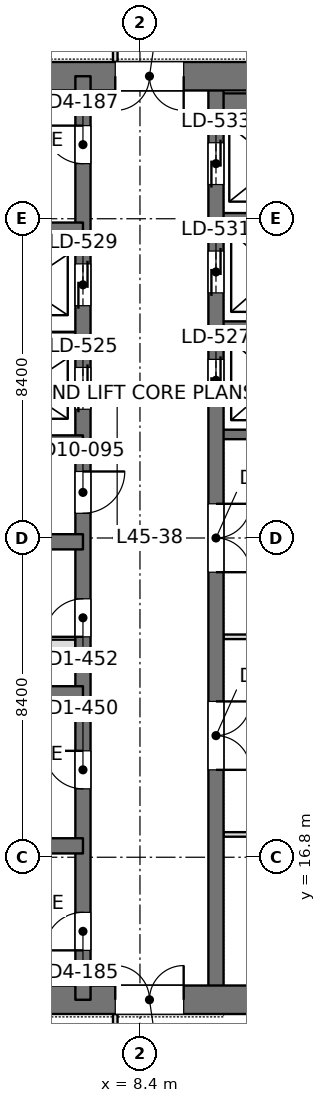
"""IFC4 building model, lengths in metres.
Left out: names, types, materials, properties, quantities, classifications, styles, units other than length and angle.
Written with IfcOpenShell. Run it as: python <this file> out.ifc"""

import sys

from ifc_helpers import new_model, si_unit, direction, frame, frame_2d, origin, place, context, subcontext, project, spatial, rectangle, extrude, element, fill, save


model = new_model("IFC4")
c1 = context("Model", 3, precision=1e-05, world=origin(), true_north=direction((0.0, 1.0)))
c2 = subcontext(c1, "Body", "Model", "MODEL_VIEW")
j1 = project(units=[si_unit("LENGTHUNIT", "METRE"), si_unit("PLANEANGLEUNIT", "RADIAN")], contexts=[c1])
p1 = place(None, origin())
s1 = spatial("IfcSite", under=j1, at=p1, CompositionType="ELEMENT")
p2 = place(p1, origin())
s2 = spatial("IfcBuilding", under=s1, at=p2, CompositionType="ELEMENT")
p3 = place(p2, frame((0.0, 0.0, 198.6)))
s3 = spatial("IfcBuildingStorey", under=s2, at=p3, CompositionType="ELEMENT", Elevation=198.6)
p4 = place(p3, frame((-1.125, 13.05, 0.0), z_axis=(0.0, 0.0, 1.0), x_axis=(1.0, 0.0, 0.0)))
e1 = element("IfcWall", 1, at=p4, inside=s3, PredefinedType="SHEAR", context=c2, shape_type="SweptSolid", body=[
    extrude(rectangle(XDim=17.85, YDim=0.75, at=frame_2d((8.925, 0.0))), origin(), (0.0, 0.0, 1.0), 4.2),
])
p5 = place(p4, frame((8.875, 0.0, 0.0)))
e2 = element("IfcOpeningElement", 2, at=p5, cuts=e1, PredefinedType="OPENING", context=c2, shape_type="SweptSolid", body=[
    extrude(rectangle(XDim=1.8, YDim=2.4, at=frame_2d((0.9, 1.2))), frame((0.0, 0.385, 0.0), z_axis=(0.0, -1.0, 0.0), x_axis=(1.0, 0.0, 0.0)), (0.0, 0.0, 1.0), 0.77),
])
p6 = place(p3, frame((-1.125, 37.35, 0.0), z_axis=(0.0, 0.0, 1.0), x_axis=(1.0, 0.0, 0.0)))
e3 = element("IfcWall", 3, at=p6, inside=s3, PredefinedType="SHEAR", context=c2, shape_type="SweptSolid", body=[
    extrude(rectangle(XDim=17.85, YDim=0.75, at=frame_2d((8.925, 0.0))), origin(), (0.0, 0.0, 1.0), 4.2),
])
p7 = place(p6, frame((8.875, 0.0, 0.0)))
e4 = element("IfcOpeningElement", 4, at=p7, cuts=e3, PredefinedType="OPENING", context=c2, shape_type="SweptSolid", body=[
    extrude(rectangle(XDim=1.8, YDim=2.4, at=frame_2d((0.9, 1.2))), frame((0.0, 0.385, 0.0), z_axis=(0.0, -1.0, 0.0), x_axis=(1.0, 0.0, 0.0)), (0.0, 0.0, 1.0), 0.77),
])
p8 = place(p3, frame((6.9, 13.05, 0.0), z_axis=(0.0, 0.0, 1.0), x_axis=(0.0, 1.0, 0.0)))
e5 = element("IfcWall", 5, at=p8, inside=s3, PredefinedType="SHEAR", context=c2, shape_type="SweptSolid", body=[
    extrude(rectangle(XDim=24.3, YDim=0.4, at=frame_2d((12.15, 0.0))), origin(), (0.0, 0.0, 1.0), 4.2),
])
p9 = place(p8, frame((1.3, 0.0, 0.0)))
e6 = element("IfcOpeningElement", 6, at=p9, cuts=e5, PredefinedType="OPENING", context=c2, shape_type="SweptSolid", body=[
    extrude(rectangle(XDim=1.0, YDim=2.2, at=frame_2d((0.5, 1.1))), frame((0.0, 0.21, 0.0), z_axis=(0.0, -1.0, 0.0), x_axis=(1.0, 0.0, 0.0)), (0.0, 0.0, 1.0), 0.42),
])
p10 = place(p8, frame((22.0, 0.0, 0.0)))
e7 = element("IfcOpeningElement", 7, at=p10, cuts=e5, PredefinedType="OPENING", context=c2, shape_type="SweptSolid", body=[
    extrude(rectangle(XDim=1.0, YDim=2.2, at=frame_2d((0.5, 1.1))), frame((0.0, 0.21, 0.0), z_axis=(0.0, -1.0, 0.0), x_axis=(1.0, 0.0, 0.0)), (0.0, 0.0, 1.0), 0.42),
])
p11 = place(p8, frame((5.55, 0.0, 0.0)))
e8 = element("IfcOpeningElement", 8, at=p11, cuts=e5, PredefinedType="OPENING", context=c2, shape_type="SweptSolid", body=[
    extrude(rectangle(XDim=1.0, YDim=2.2, at=frame_2d((0.5, 1.1))), frame((0.0, 0.21, 0.0), z_axis=(0.0, -1.0, 0.0), x_axis=(1.0, 0.0, 0.0)), (0.0, 0.0, 1.0), 0.42),
])
p12 = place(p8, frame((9.55, 0.0, 0.0)))
e9 = element("IfcOpeningElement", 9, at=p12, cuts=e5, PredefinedType="OPENING", context=c2, shape_type="SweptSolid", body=[
    extrude(rectangle(XDim=1.0, YDim=2.2, at=frame_2d((0.5, 1.1))), frame((0.0, 0.21, 0.0), z_axis=(0.0, -1.0, 0.0), x_axis=(1.0, 0.0, 0.0)), (0.0, 0.0, 1.0), 0.42),
])
p13 = place(p8, frame((12.8, 0.0, 0.0)))
e10 = element("IfcOpeningElement", 10, at=p13, cuts=e5, PredefinedType="OPENING", context=c2, shape_type="SweptSolid", body=[
    extrude(rectangle(XDim=1.1, YDim=2.2, at=frame_2d((0.55, 1.1))), frame((0.0, 0.21, 0.0), z_axis=(0.0, -1.0, 0.0), x_axis=(1.0, 0.0, 0.0)), (0.0, 0.0, 1.0), 0.42),
])
p14 = place(p8, frame((15.538, 0.0, 0.0)))
e11 = element("IfcOpeningElement", 11, at=p14, cuts=e5, PredefinedType="OPENING", context=c2, shape_type="SweptSolid", body=[
    extrude(rectangle(XDim=1.1, YDim=2.2, at=frame_2d((0.55, 1.1))), frame((0.0, 0.21, 0.0), z_axis=(0.0, -1.0, 0.0), x_axis=(1.0, 0.0, 0.0)), (0.0, 0.0, 1.0), 0.42),
])
p15 = place(p8, frame((18.262, 0.0, 0.0)))
e12 = element("IfcOpeningElement", 12, at=p15, cuts=e5, PredefinedType="OPENING", context=c2, shape_type="SweptSolid", body=[
    extrude(rectangle(XDim=1.1, YDim=2.2, at=frame_2d((0.55, 1.1))), frame((0.0, 0.21, 0.0), z_axis=(0.0, -1.0, 0.0), x_axis=(1.0, 0.0, 0.0)), (0.0, 0.0, 1.0), 0.42),
])
p16 = place(p3, frame((10.4, 13.05, 0.0), z_axis=(0.0, 0.0, 1.0), x_axis=(0.0, 1.0, 0.0)))
e13 = element("IfcWall", 13, at=p16, inside=s3, PredefinedType="SHEAR", context=c2, shape_type="SweptSolid", body=[
    extrude(rectangle(XDim=24.3, YDim=0.4, at=frame_2d((12.15, 0.0))), origin(), (0.0, 0.0, 1.0), 4.2),
])
p17 = place(p16, frame((15.75, 0.0, 0.0)))
e14 = element("IfcOpeningElement", 14, at=p17, cuts=e13, PredefinedType="OPENING", context=c2, shape_type="SweptSolid", body=[
    extrude(rectangle(XDim=1.1, YDim=2.2, at=frame_2d((0.55, 1.1))), frame((0.0, 0.21, 0.0), z_axis=(0.0, -1.0, 0.0), x_axis=(1.0, 0.0, 0.0)), (0.0, 0.0, 1.0), 0.42),
])
p18 = place(p16, frame((18.6, 0.0, 0.0)))
e15 = element("IfcOpeningElement", 15, at=p18, cuts=e13, PredefinedType="OPENING", context=c2, shape_type="SweptSolid", body=[
    extrude(rectangle(XDim=1.1, YDim=2.2, at=frame_2d((0.55, 1.1))), frame((0.0, 0.21, 0.0), z_axis=(0.0, -1.0, 0.0), x_axis=(1.0, 0.0, 0.0)), (0.0, 0.0, 1.0), 0.42),
])
p19 = place(p16, frame((21.45, 0.0, 0.0)))
e16 = element("IfcOpeningElement", 16, at=p19, cuts=e13, PredefinedType="OPENING", context=c2, shape_type="SweptSolid", body=[
    extrude(rectangle(XDim=1.1, YDim=2.2, at=frame_2d((0.55, 1.1))), frame((0.0, 0.21, 0.0), z_axis=(0.0, -1.0, 0.0), x_axis=(1.0, 0.0, 0.0)), (0.0, 0.0, 1.0), 0.42),
])
p20 = place(p16, frame((6.05, 0.0, 0.0)))
e17 = element("IfcOpeningElement", 17, at=p20, cuts=e13, PredefinedType="OPENING", context=c2, shape_type="SweptSolid", body=[
    extrude(rectangle(XDim=1.8, YDim=2.4, at=frame_2d((0.9, 1.2))), frame((0.0, 0.21, 0.0), z_axis=(0.0, -1.0, 0.0), x_axis=(1.0, 0.0, 0.0)), (0.0, 0.0, 1.0), 0.42),
])
p21 = place(p16, frame((11.25, 0.0, 0.0)))
e18 = element("IfcOpeningElement", 18, at=p21, cuts=e13, PredefinedType="OPENING", context=c2, shape_type="SweptSolid", body=[
    extrude(rectangle(XDim=1.8, YDim=2.4, at=frame_2d((0.9, 1.2))), frame((0.0, 0.21, 0.0), z_axis=(0.0, -1.0, 0.0), x_axis=(1.0, 0.0, 0.0)), (0.0, 0.0, 1.0), 0.42),
])
for number, where, z_axis, x_axis in (
    (19, (-0.75, 17.1, 0.0), (0.0, 0.0, 1.0), (1.0, 0.0, 0.0)),
    (20, (-0.75, 21.1, 0.0), (0.0, 0.0, 1.0), (1.0, 0.0, 0.0)),
    (21, (-0.75, 25.1, 0.0), (0.0, 0.0, 1.0), (1.0, 0.0, 0.0)),
    (22, (-0.75, 27.7, 0.0), (0.0, 0.0, 1.0), (1.0, 0.0, 0.0)),
    (23, (-0.75, 33.3, 0.0), (0.0, 0.0, 1.0), (1.0, 0.0, 0.0)),
):
    element("IfcWall", number, at=place(p3, frame(where, z_axis=z_axis, x_axis=x_axis)), inside=s3, PredefinedType="SHEAR", context=c2, shape_type="SweptSolid", body=[
        extrude(rectangle(XDim=7.65, YDim=0.4, at=frame_2d((3.825, 0.0))), origin(), (0.0, 0.0, 1.0), 4.2),
    ])
p22 = place(p3, frame((3.7, 30.5, 0.0), z_axis=(0.0, 0.0, 1.0), x_axis=(1.0, 0.0, 0.0)))
e24 = element("IfcWall", 24, at=p22, inside=s3, PredefinedType="SHEAR", context=c2, shape_type="SweptSolid", body=[
    extrude(rectangle(XDim=3.2, YDim=0.25, at=frame_2d((1.6, 0.0))), origin(), (0.0, 0.0, 1.0), 4.2),
])
p23 = place(p3, frame((10.4, 27.925, 0.0), z_axis=(0.0, 0.0, 1.0), x_axis=(1.0, 0.0, 0.0)))
e25 = element("IfcWall", 25, at=p23, inside=s3, PredefinedType="SHEAR", context=c2, shape_type="SweptSolid", body=[
    extrude(rectangle(XDim=5.95, YDim=0.25, at=frame_2d((2.975, 0.0))), origin(), (0.0, 0.0, 1.0), 4.2),
])
for number, where, z_axis, x_axis in (
    (26, (10.4, 30.775, 0.0), (0.0, 0.0, 1.0), (1.0, 0.0, 0.0)),
    (27, (10.4, 33.625, 0.0), (0.0, 0.0, 1.0), (1.0, 0.0, 0.0)),
):
    element("IfcWall", number, at=place(p3, frame(where, z_axis=z_axis, x_axis=x_axis)), inside=s3, PredefinedType="SHEAR", context=c2, shape_type="SweptSolid", body=[
        extrude(rectangle(XDim=3.2, YDim=0.25, at=frame_2d((1.6, 0.0))), origin(), (0.0, 0.0, 1.0), 4.2),
    ])
p24 = place(p3, frame((10.4, 36.625, 0.0), z_axis=(0.0, 0.0, 1.0), x_axis=(1.0, 0.0, 0.0)))
e28 = element("IfcWall", 28, at=p24, inside=s3, PredefinedType="SHEAR", context=c2, shape_type="SweptSolid", body=[
    extrude(rectangle(XDim=3.2, YDim=0.55, at=frame_2d((1.6, 0.0))), origin(), (0.0, 0.0, 1.0), 4.2),
])
p25 = place(p3, frame((10.598, 17.4, 0.0), z_axis=(0.0, 0.0, 1.0), x_axis=(1.0, 0.0, 0.0)))
e29 = element("IfcWall", 29, at=p25, inside=s3, PredefinedType="PARTITIONING", context=c2, shape_type="SweptSolid", body=[
    extrude(rectangle(XDim=5.904, YDim=0.12, at=frame_2d((2.952, 0.0))), origin(), (0.0, 0.0, 1.0), 3.55),
])
p26 = place(p3, frame((10.598, 22.6, 0.0), z_axis=(0.0, 0.0, 1.0), x_axis=(1.0, 0.0, 0.0)))
e30 = element("IfcWall", 30, at=p26, inside=s3, PredefinedType="PARTITIONING", context=c2, shape_type="SweptSolid", body=[
    extrude(rectangle(XDim=5.053, YDim=0.12, at=frame_2d((2.526, 0.0))), origin(), (0.0, 0.0, 1.0), 4.05),
])
p27 = place(p3, frame((7.75, 10.758, 0.0), z_axis=(0.0, 0.0, 1.0), x_axis=(0.0, 1.0, 0.0)))
e31 = element("IfcWall", 31, at=p27, inside=s3, PredefinedType="PARTITIONING", context=c2, shape_type="SweptSolid", body=[
    extrude(rectangle(XDim=1.918, YDim=0.12, at=frame_2d((0.959, 0.0))), origin(), (0.0, 0.0, 1.0), 4.05),
])
p28 = place(p27, frame((0.392, 0.0, 0.0)))
e32 = element("IfcOpeningElement", 32, at=p28, cuts=e31, PredefinedType="OPENING", context=c2, shape_type="SweptSolid", body=[
    extrude(rectangle(XDim=1.0, YDim=2.4, at=frame_2d((0.5, 1.2))), frame((0.0, 0.07, 0.0), z_axis=(0.0, -1.0, 0.0), x_axis=(1.0, 0.0, 0.0)), (0.0, 0.0, 1.0), 0.14),
])
p29 = place(p3, frame((7.75, 37.724, 0.0), z_axis=(0.0, 0.0, 1.0), x_axis=(0.0, 1.0, 0.0)))
e33 = element("IfcWall", 33, at=p29, inside=s3, PredefinedType="PARTITIONING", context=c2, shape_type="SweptSolid", body=[
    extrude(rectangle(XDim=1.918, YDim=0.12, at=frame_2d((0.959, 0.0))), origin(), (0.0, 0.0, 1.0), 4.05),
])
p30 = place(p29, frame((0.526, 0.0, 0.0)))
e34 = element("IfcOpeningElement", 34, at=p30, cuts=e33, PredefinedType="OPENING", context=c2, shape_type="SweptSolid", body=[
    extrude(rectangle(XDim=1.0, YDim=2.4, at=frame_2d((0.5, 1.2))), frame((0.0, 0.07, 0.0), z_axis=(0.0, -1.0, 0.0), x_axis=(1.0, 0.0, 0.0)), (0.0, 0.0, 1.0), 0.14),
])
p31 = place(p3, frame((0.025, 22.4, 0.0), z_axis=(0.0, 0.0, 1.0), x_axis=(1.0, 0.0, 0.0)))
e35 = element("IfcWall", 35, at=p31, inside=s3, PredefinedType="PARTITIONING", context=c2, shape_type="SweptSolid", body=[
    extrude(rectangle(XDim=6.675, YDim=0.25, at=frame_2d((3.337, 0.0))), origin(), (0.0, 0.0, 1.0), 4.0),
])
p32 = place(p31, frame((2.913, 0.0, 0.0)))
e36 = element("IfcOpeningElement", 36, at=p32, cuts=e35, PredefinedType="OPENING", context=c2, shape_type="SweptSolid", body=[
    extrude(rectangle(XDim=0.9, YDim=2.2, at=frame_2d((0.45, 1.1))), frame((0.0, 0.135, 0.0), z_axis=(0.0, -1.0, 0.0), x_axis=(1.0, 0.0, 0.0)), (0.0, 0.0, 1.0), 0.27),
])
p33 = place(p5, origin())
e37 = element("IfcDoor", 37, at=p33, inside=s3, OperationType="DOUBLE_DOOR_SINGLE_SWING", PredefinedType="DOOR", context=c2, shape_type="SweptSolid", body=[
    extrude(rectangle(XDim=1.8, YDim=2.4, at=frame_2d((0.9, 1.2))), frame((0.0, 0.025, 0.0), z_axis=(0.0, -1.0, 0.0), x_axis=(1.0, 0.0, 0.0)), (0.0, 0.0, 1.0), 0.05),
])
fill(e2, e37)
p34 = place(p7, frame((1.8, 0.0, 0.0), z_axis=(0.0, 0.0, 1.0), x_axis=(-1.0, 0.0, 0.0)))
e38 = element("IfcDoor", 38, at=p34, inside=s3, OperationType="DOUBLE_DOOR_SINGLE_SWING", PredefinedType="DOOR", context=c2, shape_type="SweptSolid", body=[
    extrude(rectangle(XDim=1.8, YDim=2.4, at=frame_2d((0.9, 1.2))), frame((0.0, 0.025, 0.0), z_axis=(0.0, -1.0, 0.0), x_axis=(1.0, 0.0, 0.0)), (0.0, 0.0, 1.0), 0.05),
])
fill(e4, e38)
p35 = place(p9, origin())
e39 = element("IfcDoor", 39, at=p35, inside=s3, OperationType="SINGLE_SWING_LEFT", PredefinedType="DOOR", context=c2, shape_type="SweptSolid", body=[
    extrude(rectangle(XDim=1.0, YDim=2.2, at=frame_2d((0.5, 1.1))), frame((0.0, 0.025, 0.0), z_axis=(0.0, -1.0, 0.0), x_axis=(1.0, 0.0, 0.0)), (0.0, 0.0, 1.0), 0.05),
])
fill(e6, e39)
p36 = place(p10, origin())
e40 = element("IfcDoor", 40, at=p36, inside=s3, OperationType="SINGLE_SWING_RIGHT", PredefinedType="DOOR", context=c2, shape_type="SweptSolid", body=[
    extrude(rectangle(XDim=1.0, YDim=2.2, at=frame_2d((0.5, 1.1))), frame((0.0, 0.025, 0.0), z_axis=(0.0, -1.0, 0.0), x_axis=(1.0, 0.0, 0.0)), (0.0, 0.0, 1.0), 0.05),
])
fill(e7, e40)
p37 = place(p11, origin())
e41 = element("IfcDoor", 41, at=p37, inside=s3, OperationType="SINGLE_SWING_RIGHT", PredefinedType="DOOR", context=c2, shape_type="SweptSolid", body=[
    extrude(rectangle(XDim=1.0, YDim=2.2, at=frame_2d((0.5, 1.1))), frame((0.0, 0.025, 0.0), z_axis=(0.0, -1.0, 0.0), x_axis=(1.0, 0.0, 0.0)), (0.0, 0.0, 1.0), 0.05),
])
fill(e8, e41)
p38 = place(p12, origin())
e42 = element("IfcDoor", 42, at=p38, inside=s3, OperationType="SINGLE_SWING_LEFT", PredefinedType="DOOR", context=c2, shape_type="SweptSolid", body=[
    extrude(rectangle(XDim=1.0, YDim=2.2, at=frame_2d((0.5, 1.1))), frame((0.0, 0.025, 0.0), z_axis=(0.0, -1.0, 0.0), x_axis=(1.0, 0.0, 0.0)), (0.0, 0.0, 1.0), 0.05),
])
fill(e9, e42)
p39 = place(p13, frame((1.1, 0.0, 0.0), z_axis=(0.0, 0.0, 1.0), x_axis=(-1.0, 0.0, 0.0)))
e43 = element("IfcDoor", 43, at=p39, inside=s3, OperationType="SINGLE_SWING_LEFT", PredefinedType="DOOR", context=c2, shape_type="SweptSolid", body=[
    extrude(rectangle(XDim=1.1, YDim=2.2, at=frame_2d((0.55, 1.1))), frame((0.0, 0.025, 0.0), z_axis=(0.0, -1.0, 0.0), x_axis=(1.0, 0.0, 0.0)), (0.0, 0.0, 1.0), 0.05),
])
fill(e10, e43)
p40 = place(p17, origin())
e44 = element("IfcDoor", 44, at=p40, inside=s3, OperationType="DOUBLE_DOOR_SLIDING", PredefinedType="DOOR", context=c2, shape_type="SweptSolid", body=[
    extrude(rectangle(XDim=1.1, YDim=2.2, at=frame_2d((0.55, 1.1))), frame((0.0, 0.025, 0.0), z_axis=(0.0, -1.0, 0.0), x_axis=(1.0, 0.0, 0.0)), (0.0, 0.0, 1.0), 0.05),
])
fill(e14, e44)
p41 = place(p18, origin())
e45 = element("IfcDoor", 45, at=p41, inside=s3, OperationType="DOUBLE_DOOR_SLIDING", PredefinedType="DOOR", context=c2, shape_type="SweptSolid", body=[
    extrude(rectangle(XDim=1.1, YDim=2.2, at=frame_2d((0.55, 1.1))), frame((0.0, 0.025, 0.0), z_axis=(0.0, -1.0, 0.0), x_axis=(1.0, 0.0, 0.0)), (0.0, 0.0, 1.0), 0.05),
])
fill(e15, e45)
p42 = place(p19, origin())
e46 = element("IfcDoor", 46, at=p42, inside=s3, OperationType="DOUBLE_DOOR_SLIDING", PredefinedType="DOOR", context=c2, shape_type="SweptSolid", body=[
    extrude(rectangle(XDim=1.1, YDim=2.2, at=frame_2d((0.55, 1.1))), frame((0.0, 0.025, 0.0), z_axis=(0.0, -1.0, 0.0), x_axis=(1.0, 0.0, 0.0)), (0.0, 0.0, 1.0), 0.05),
])
fill(e16, e46)
p43 = place(p14, origin())
e47 = element("IfcDoor", 47, at=p43, inside=s3, OperationType="DOUBLE_DOOR_SLIDING", PredefinedType="DOOR", context=c2, shape_type="SweptSolid", body=[
    extrude(rectangle(XDim=1.1, YDim=2.2, at=frame_2d((0.55, 1.1))), frame((0.0, 0.025, 0.0), z_axis=(0.0, -1.0, 0.0), x_axis=(1.0, 0.0, 0.0)), (0.0, 0.0, 1.0), 0.05),
])
fill(e11, e47)
p44 = place(p15, origin())
e48 = element("IfcDoor", 48, at=p44, inside=s3, OperationType="DOUBLE_DOOR_SLIDING", PredefinedType="DOOR", context=c2, shape_type="SweptSolid", body=[
    extrude(rectangle(XDim=1.1, YDim=2.2, at=frame_2d((0.55, 1.1))), frame((0.0, 0.025, 0.0), z_axis=(0.0, -1.0, 0.0), x_axis=(1.0, 0.0, 0.0)), (0.0, 0.0, 1.0), 0.05),
])
fill(e12, e48)
p45 = place(p20, frame((1.8, 0.0, 0.0), z_axis=(0.0, 0.0, 1.0), x_axis=(-1.0, 0.0, 0.0)))
e49 = element("IfcDoor", 49, at=p45, inside=s3, OperationType="DOUBLE_DOOR_SINGLE_SWING", PredefinedType="DOOR", context=c2, shape_type="SweptSolid", body=[
    extrude(rectangle(XDim=1.8, YDim=2.4, at=frame_2d((0.9, 1.2))), frame((0.0, 0.025, 0.0), z_axis=(0.0, -1.0, 0.0), x_axis=(1.0, 0.0, 0.0)), (0.0, 0.0, 1.0), 0.05),
])
fill(e17, e49)
p46 = place(p21, frame((1.8, 0.0, 0.0), z_axis=(0.0, 0.0, 1.0), x_axis=(-1.0, 0.0, 0.0)))
e50 = element("IfcDoor", 50, at=p46, inside=s3, OperationType="DOUBLE_DOOR_SINGLE_SWING", PredefinedType="DOOR", context=c2, shape_type="SweptSolid", body=[
    extrude(rectangle(XDim=1.8, YDim=2.4, at=frame_2d((0.9, 1.2))), frame((0.0, 0.025, 0.0), z_axis=(0.0, -1.0, 0.0), x_axis=(1.0, 0.0, 0.0)), (0.0, 0.0, 1.0), 0.05),
])
fill(e18, e50)
save(model, sys.argv[1])
